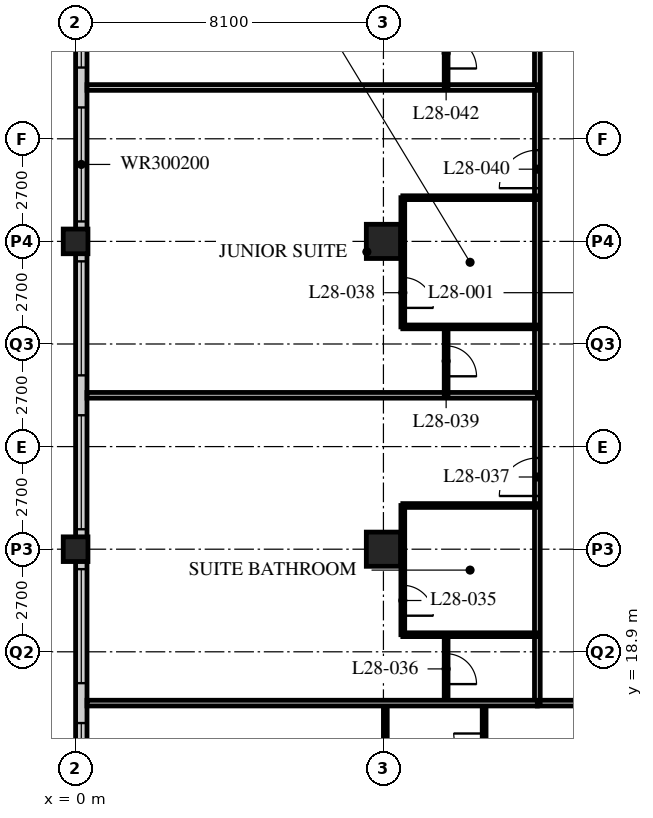
"""IFC4 building model, lengths in metres.
Left out: names, types, materials, properties, quantities, classifications, styles, units other than length and angle.
Written with IfcOpenShell. Run it as: python <this file> out.ifc"""

import sys

from ifc_helpers import new_model, si_unit, direction, frame, frame_2d, origin, origin_2d, place, context, subcontext, project, spatial, rectangle, hollow_rectangle, extrude, element, fill, save


model = new_model("IFC4")
c1 = context("Model", 3, precision=1e-05, world=origin(), true_north=direction((0.0, 1.0)))
c2 = subcontext(c1, "Body", "Model", "MODEL_VIEW")
j1 = project(units=[si_unit("LENGTHUNIT", "METRE"), si_unit("PLANEANGLEUNIT", "RADIAN")], contexts=[c1])
p1 = place(None, origin())
s1 = spatial("IfcSite", under=j1, at=p1, CompositionType="ELEMENT")
p2 = place(p1, origin())
s2 = spatial("IfcBuilding", under=s1, at=p2, CompositionType="ELEMENT")
p3 = place(p2, frame((0.0, 0.0, 113.6)))
s3 = spatial("IfcBuildingStorey", under=s2, at=p3, CompositionType="ELEMENT", Elevation=113.6)
for number, where, z_axis, x_axis in (
    (1, (0.0, 21.6, 0.0), (0.0, 0.0, 1.0), (1.0, 0.0, 0.0)),
    (2, (0.0, 29.7, 0.0), (0.0, 0.0, 1.0), (1.0, 0.0, 0.0)),
):
    element("IfcColumn", number, at=place(p3, frame(where, z_axis=z_axis, x_axis=x_axis)), inside=s3, PredefinedType="COLUMN", context=c2, shape_type="SweptSolid", body=[
        extrude(hollow_rectangle(XDim=0.65, YDim=0.65, WallThickness=0.055, at=origin_2d()), origin(), (0.0, 0.0, 1.0), 3.4),
    ])
for number, where, z_axis, x_axis in (
    (3, (8.1, 21.6, 0.0), (0.0, 0.0, 1.0), (1.0, 0.0, 0.0)),
    (4, (8.1, 29.7, 0.0), (0.0, 0.0, 1.0), (1.0, 0.0, 0.0)),
):
    element("IfcColumn", number, at=place(p3, frame(where, z_axis=z_axis, x_axis=x_axis)), inside=s3, PredefinedType="COLUMN", context=c2, shape_type="SweptSolid", body=[
        extrude(hollow_rectangle(XDim=0.9, YDim=0.9, WallThickness=0.09, at=origin_2d()), origin(), (0.0, 0.0, 1.0), 3.4),
    ])
p4 = place(p3, frame((0.15, 45.6, 0.0), z_axis=(0.0, 0.0, 1.0), x_axis=(0.0, -1.0, 0.0)))
e5 = element("IfcWall", 5, at=p4, inside=s3, PredefinedType="SOLIDWALL", context=c2, shape_type="SweptSolid", body=[
    extrude(rectangle(XDim=32.1, YDim=0.3, at=frame_2d((16.05, 0.0))), origin(), (0.0, 0.0, 1.0), 3.19),
])
p5 = place(p4, frame((0.225, 0.0, 0.9)))
e6 = element("IfcOpeningElement", 6, at=p5, cuts=e5, PredefinedType="OPENING", context=c2, shape_type="SweptSolid", body=[
    extrude(rectangle(XDim=3.0, YDim=2.0, at=frame_2d((1.5, 1.0))), frame((0.0, 0.16, 0.0), z_axis=(0.0, -1.0, 0.0), x_axis=(1.0, 0.0, 0.0)), (0.0, 0.0, 1.0), 0.32),
])
p6 = place(p4, frame((4.275, 0.0, 0.9)))
e7 = element("IfcOpeningElement", 7, at=p6, cuts=e5, PredefinedType="OPENING", context=c2, shape_type="SweptSolid", body=[
    extrude(rectangle(XDim=3.0, YDim=2.0, at=frame_2d((1.5, 1.0))), frame((0.0, 0.16, 0.0), z_axis=(0.0, -1.0, 0.0), x_axis=(1.0, 0.0, 0.0)), (0.0, 0.0, 1.0), 0.32),
])
p7 = place(p4, frame((8.325, 0.0, 0.9)))
e8 = element("IfcOpeningElement", 8, at=p7, cuts=e5, PredefinedType="OPENING", context=c2, shape_type="SweptSolid", body=[
    extrude(rectangle(XDim=3.0, YDim=2.0, at=frame_2d((1.5, 1.0))), frame((0.0, 0.16, 0.0), z_axis=(0.0, -1.0, 0.0), x_axis=(1.0, 0.0, 0.0)), (0.0, 0.0, 1.0), 0.32),
])
p8 = place(p4, frame((12.375, 0.0, 0.9)))
e9 = element("IfcOpeningElement", 9, at=p8, cuts=e5, PredefinedType="OPENING", context=c2, shape_type="SweptSolid", body=[
    extrude(rectangle(XDim=3.0, YDim=2.0, at=frame_2d((1.5, 1.0))), frame((0.0, 0.16, 0.0), z_axis=(0.0, -1.0, 0.0), x_axis=(1.0, 0.0, 0.0)), (0.0, 0.0, 1.0), 0.32),
])
p9 = place(p4, frame((16.425, 0.0, 0.9)))
e10 = element("IfcOpeningElement", 10, at=p9, cuts=e5, PredefinedType="OPENING", context=c2, shape_type="SweptSolid", body=[
    extrude(rectangle(XDim=3.0, YDim=2.0, at=frame_2d((1.5, 1.0))), frame((0.0, 0.16, 0.0), z_axis=(0.0, -1.0, 0.0), x_axis=(1.0, 0.0, 0.0)), (0.0, 0.0, 1.0), 0.32),
])
p10 = place(p4, frame((20.475, 0.0, 0.9)))
e11 = element("IfcOpeningElement", 11, at=p10, cuts=e5, PredefinedType="OPENING", context=c2, shape_type="SweptSolid", body=[
    extrude(rectangle(XDim=3.0, YDim=2.0, at=frame_2d((1.5, 1.0))), frame((0.0, 0.16, 0.0), z_axis=(0.0, -1.0, 0.0), x_axis=(1.0, 0.0, 0.0)), (0.0, 0.0, 1.0), 0.32),
])
p11 = place(p4, frame((24.525, 0.0, 0.9)))
e12 = element("IfcOpeningElement", 12, at=p11, cuts=e5, PredefinedType="OPENING", context=c2, shape_type="SweptSolid", body=[
    extrude(rectangle(XDim=3.0, YDim=2.0, at=frame_2d((1.5, 1.0))), frame((0.0, 0.16, 0.0), z_axis=(0.0, -1.0, 0.0), x_axis=(1.0, 0.0, 0.0)), (0.0, 0.0, 1.0), 0.32),
])
p12 = place(p4, frame((28.575, 0.0, 0.9)))
e13 = element("IfcOpeningElement", 13, at=p12, cuts=e5, PredefinedType="OPENING", context=c2, shape_type="SweptSolid", body=[
    extrude(rectangle(XDim=3.0, YDim=2.0, at=frame_2d((1.5, 1.0))), frame((0.0, 0.16, 0.0), z_axis=(0.0, -1.0, 0.0), x_axis=(1.0, 0.0, 0.0)), (0.0, 0.0, 1.0), 0.32),
])
p13 = place(p3, frame((12.15, 17.55, 0.0), z_axis=(0.0, 0.0, 1.0), x_axis=(1.0, 0.0, 0.0)))
e14 = element("IfcWall", 14, at=p13, inside=s3, PredefinedType="PARTITIONING", context=c2, shape_type="SweptSolid", body=[
    extrude(rectangle(XDim=32.4, YDim=0.15, at=frame_2d((16.2, 0.0))), origin(), (0.0, 0.0, 1.0), 3.19),
])
p14 = place(p13, frame((5.95, 0.0, 0.0)))
e15 = element("IfcOpeningElement", 15, at=p14, cuts=e14, PredefinedType="OPENING", context=c2, shape_type="SweptSolid", body=[
    extrude(rectangle(XDim=1.0, YDim=2.1, at=frame_2d((0.5, 1.05))), frame((0.0, 0.085, 0.0), z_axis=(0.0, -1.0, 0.0), x_axis=(1.0, 0.0, 0.0)), (0.0, 0.0, 1.0), 0.17),
])
p15 = place(p13, frame((17.725, 0.0, 0.0)))
e16 = element("IfcOpeningElement", 16, at=p15, cuts=e14, PredefinedType="OPENING", context=c2, shape_type="SweptSolid", body=[
    extrude(rectangle(XDim=1.0, YDim=2.1, at=frame_2d((0.5, 1.05))), frame((0.0, 0.085, 0.0), z_axis=(0.0, -1.0, 0.0), x_axis=(1.0, 0.0, 0.0)), (0.0, 0.0, 1.0), 0.17),
])
p16 = place(p13, frame((26.75, 0.0, 0.0)))
e17 = element("IfcOpeningElement", 17, at=p16, cuts=e14, PredefinedType="OPENING", context=c2, shape_type="SweptSolid", body=[
    extrude(rectangle(XDim=1.0, YDim=2.1, at=frame_2d((0.5, 1.05))), frame((0.0, 0.085, 0.0), z_axis=(0.0, -1.0, 0.0), x_axis=(1.0, 0.0, 0.0)), (0.0, 0.0, 1.0), 0.17),
])
p17 = place(p13, frame((1.525, 0.0, 0.0)))
e18 = element("IfcOpeningElement", 18, at=p17, cuts=e14, PredefinedType="OPENING", context=c2, shape_type="SweptSolid", body=[
    extrude(rectangle(XDim=1.0, YDim=2.1, at=frame_2d((0.5, 1.05))), frame((0.0, 0.085, 0.0), z_axis=(0.0, -1.0, 0.0), x_axis=(1.0, 0.0, 0.0)), (0.0, 0.0, 1.0), 0.17),
])
p18 = place(p13, frame((29.875, 0.0, 0.0)))
e19 = element("IfcOpeningElement", 19, at=p18, cuts=e14, PredefinedType="OPENING", context=c2, shape_type="SweptSolid", body=[
    extrude(rectangle(XDim=1.0, YDim=2.1, at=frame_2d((0.5, 1.05))), frame((0.0, 0.085, 0.0), z_axis=(0.0, -1.0, 0.0), x_axis=(1.0, 0.0, 0.0)), (0.0, 0.0, 1.0), 0.17),
])
p19 = place(p3, frame((12.15, 17.55, 0.0), z_axis=(0.0, 0.0, 1.0), x_axis=(0.0, 1.0, 0.0)))
e20 = element("IfcWall", 20, at=p19, inside=s3, PredefinedType="PARTITIONING", context=c2, shape_type="SweptSolid", body=[
    extrude(rectangle(XDim=28.35, YDim=0.15, at=frame_2d((14.175, 0.0))), origin(), (0.0, 0.0, 1.0), 3.19),
])
p20 = place(p19, frame((5.45, 0.0, 0.0)))
e21 = element("IfcOpeningElement", 21, at=p20, cuts=e20, PredefinedType="OPENING", context=c2, shape_type="SweptSolid", body=[
    extrude(rectangle(XDim=1.0, YDim=2.1, at=frame_2d((0.5, 1.05))), frame((0.0, 0.085, 0.0), z_axis=(0.0, -1.0, 0.0), x_axis=(1.0, 0.0, 0.0)), (0.0, 0.0, 1.0), 0.17),
])
p21 = place(p19, frame((13.55, 0.0, 0.0)))
e22 = element("IfcOpeningElement", 22, at=p21, cuts=e20, PredefinedType="OPENING", context=c2, shape_type="SweptSolid", body=[
    extrude(rectangle(XDim=1.0, YDim=2.1, at=frame_2d((0.5, 1.05))), frame((0.0, 0.085, 0.0), z_axis=(0.0, -1.0, 0.0), x_axis=(1.0, 0.0, 0.0)), (0.0, 0.0, 1.0), 0.17),
])
p22 = place(p19, frame((21.65, 0.0, 0.0)))
e23 = element("IfcOpeningElement", 23, at=p22, cuts=e20, PredefinedType="OPENING", context=c2, shape_type="SweptSolid", body=[
    extrude(rectangle(XDim=1.0, YDim=2.1, at=frame_2d((0.5, 1.05))), frame((0.0, 0.085, 0.0), z_axis=(0.0, -1.0, 0.0), x_axis=(1.0, 0.0, 0.0)), (0.0, 0.0, 1.0), 0.17),
])
p23 = place(p19, frame((26.75, 0.0, 0.0)))
e24 = element("IfcOpeningElement", 24, at=p23, cuts=e20, PredefinedType="OPENING", context=c2, shape_type="SweptSolid", body=[
    extrude(rectangle(XDim=1.0, YDim=2.1, at=frame_2d((0.5, 1.05))), frame((0.0, 0.085, 0.0), z_axis=(0.0, -1.0, 0.0), x_axis=(1.0, 0.0, 0.0)), (0.0, 0.0, 1.0), 0.17),
])
p24 = place(p3, frame((8.61, 19.35, 0.0), z_axis=(0.0, 0.0, 1.0), x_axis=(0.0, 1.0, 0.0)))
e25 = element("IfcWall", 25, at=p24, inside=s3, PredefinedType="PARTITIONING", context=c2, shape_type="SweptSolid", body=[
    extrude(rectangle(XDim=3.4, YDim=0.1, at=frame_2d((1.7, 0.0))), origin(), (0.0, 0.0, 1.0), 3.19),
])
p25 = place(p24, frame((0.5, 0.0, 0.0)))
e26 = element("IfcOpeningElement", 26, at=p25, cuts=e25, PredefinedType="OPENING", context=c2, shape_type="SweptSolid", body=[
    extrude(rectangle(XDim=0.8, YDim=2.1, at=frame_2d((0.4, 1.05))), frame((0.0, 0.06, 0.0), z_axis=(0.0, -1.0, 0.0), x_axis=(1.0, 0.0, 0.0)), (0.0, 0.0, 1.0), 0.12),
])
p26 = place(p3, frame((9.75, 17.55, 0.0), z_axis=(0.0, 0.0, 1.0), x_axis=(0.0, 1.0, 0.0)))
e27 = element("IfcWall", 27, at=p26, inside=s3, PredefinedType="PARTITIONING", context=c2, shape_type="SweptSolid", body=[
    extrude(rectangle(XDim=1.8, YDim=0.1, at=frame_2d((0.9, 0.0))), origin(), (0.0, 0.0, 1.0), 3.19),
])
p27 = place(p26, frame((0.5, 0.0, 0.0)))
e28 = element("IfcOpeningElement", 28, at=p27, cuts=e27, PredefinedType="OPENING", context=c2, shape_type="SweptSolid", body=[
    extrude(rectangle(XDim=0.8, YDim=2.1, at=frame_2d((0.4, 1.05))), frame((0.0, 0.06, 0.0), z_axis=(0.0, -1.0, 0.0), x_axis=(1.0, 0.0, 0.0)), (0.0, 0.0, 1.0), 0.12),
])
for number, where, z_axis, x_axis in (
    (29, (12.15, 19.35, 0.0), (0.0, 0.0, 1.0), (-1.0, 0.0, 0.0)),
    (30, (12.15, 22.75, 0.0), (0.0, 0.0, 1.0), (-1.0, 0.0, 0.0)),
):
    element("IfcWall", number, at=place(p3, frame(where, z_axis=z_axis, x_axis=x_axis)), inside=s3, PredefinedType="PARTITIONING", context=c2, shape_type="SweptSolid", body=[
        extrude(rectangle(XDim=3.54, YDim=0.1, at=frame_2d((1.77, 0.0))), origin(), (0.0, 0.0, 1.0), 3.19),
    ])
p28 = place(p3, frame((12.15, 25.65, 0.0), z_axis=(0.0, 0.0, 1.0), x_axis=(-1.0, 0.0, 0.0)))
e31 = element("IfcWall", 31, at=p28, inside=s3, PredefinedType="PARTITIONING", context=c2, shape_type="SweptSolid", body=[
    extrude(rectangle(XDim=11.85, YDim=0.15, at=frame_2d((5.925, 0.0))), origin(), (0.0, 0.0, 1.0), 3.19),
])
p29 = place(p3, frame((8.61, 27.45, 0.0), z_axis=(0.0, 0.0, 1.0), x_axis=(0.0, 1.0, 0.0)))
e32 = element("IfcWall", 32, at=p29, inside=s3, PredefinedType="PARTITIONING", context=c2, shape_type="SweptSolid", body=[
    extrude(rectangle(XDim=3.4, YDim=0.1, at=frame_2d((1.7, 0.0))), origin(), (0.0, 0.0, 1.0), 3.19),
])
p30 = place(p29, frame((0.5, 0.0, 0.0)))
e33 = element("IfcOpeningElement", 33, at=p30, cuts=e32, PredefinedType="OPENING", context=c2, shape_type="SweptSolid", body=[
    extrude(rectangle(XDim=0.8, YDim=2.1, at=frame_2d((0.4, 1.05))), frame((0.0, 0.06, 0.0), z_axis=(0.0, -1.0, 0.0), x_axis=(1.0, 0.0, 0.0)), (0.0, 0.0, 1.0), 0.12),
])
p31 = place(p3, frame((9.75, 25.65, 0.0), z_axis=(0.0, 0.0, 1.0), x_axis=(0.0, 1.0, 0.0)))
e34 = element("IfcWall", 34, at=p31, inside=s3, PredefinedType="PARTITIONING", context=c2, shape_type="SweptSolid", body=[
    extrude(rectangle(XDim=1.8, YDim=0.1, at=frame_2d((0.9, 0.0))), origin(), (0.0, 0.0, 1.0), 3.19),
])
p32 = place(p31, frame((0.5, 0.0, 0.0)))
e35 = element("IfcOpeningElement", 35, at=p32, cuts=e34, PredefinedType="OPENING", context=c2, shape_type="SweptSolid", body=[
    extrude(rectangle(XDim=0.8, YDim=2.1, at=frame_2d((0.4, 1.05))), frame((0.0, 0.06, 0.0), z_axis=(0.0, -1.0, 0.0), x_axis=(1.0, 0.0, 0.0)), (0.0, 0.0, 1.0), 0.12),
])
for number, where, z_axis, x_axis in (
    (36, (12.15, 27.45, 0.0), (0.0, 0.0, 1.0), (-1.0, 0.0, 0.0)),
    (37, (12.15, 30.85, 0.0), (0.0, 0.0, 1.0), (-1.0, 0.0, 0.0)),
):
    element("IfcWall", number, at=place(p3, frame(where, z_axis=z_axis, x_axis=x_axis)), inside=s3, PredefinedType="PARTITIONING", context=c2, shape_type="SweptSolid", body=[
        extrude(rectangle(XDim=3.54, YDim=0.1, at=frame_2d((1.77, 0.0))), origin(), (0.0, 0.0, 1.0), 3.19),
    ])
p33 = place(p3, frame((12.15, 33.75, 0.0), z_axis=(0.0, 0.0, 1.0), x_axis=(-1.0, 0.0, 0.0)))
e38 = element("IfcWall", 38, at=p33, inside=s3, PredefinedType="PARTITIONING", context=c2, shape_type="SweptSolid", body=[
    extrude(rectangle(XDim=11.85, YDim=0.15, at=frame_2d((5.925, 0.0))), origin(), (0.0, 0.0, 1.0), 3.19),
])
p34 = place(p3, frame((9.75, 33.75, 0.0), z_axis=(0.0, 0.0, 1.0), x_axis=(0.0, 1.0, 0.0)))
e39 = element("IfcWall", 39, at=p34, inside=s3, PredefinedType="PARTITIONING", context=c2, shape_type="SweptSolid", body=[
    extrude(rectangle(XDim=1.8, YDim=0.1, at=frame_2d((0.9, 0.0))), origin(), (0.0, 0.0, 1.0), 3.19),
])
p35 = place(p34, frame((0.5, 0.0, 0.0)))
e40 = element("IfcOpeningElement", 40, at=p35, cuts=e39, PredefinedType="OPENING", context=c2, shape_type="SweptSolid", body=[
    extrude(rectangle(XDim=0.8, YDim=2.1, at=frame_2d((0.4, 1.05))), frame((0.0, 0.06, 0.0), z_axis=(0.0, -1.0, 0.0), x_axis=(1.0, 0.0, 0.0)), (0.0, 0.0, 1.0), 0.12),
])
p36 = place(p3, frame((10.75, 17.55, 0.0), z_axis=(0.0, 0.0, 1.0), x_axis=(0.0, -1.0, 0.0)))
e41 = element("IfcWall", 41, at=p36, inside=s3, PredefinedType="PARTITIONING", context=c2, shape_type="SweptSolid", body=[
    extrude(rectangle(XDim=2.4, YDim=0.1, at=frame_2d((1.2, 0.0))), origin(), (0.0, 0.0, 1.0), 3.19),
])
p37 = place(p36, frame((0.8, 0.0, 0.0)))
e42 = element("IfcOpeningElement", 42, at=p37, cuts=e41, PredefinedType="OPENING", context=c2, shape_type="SweptSolid", body=[
    extrude(rectangle(XDim=0.8, YDim=2.1, at=frame_2d((0.4, 1.05))), frame((0.0, 0.06, 0.0), z_axis=(0.0, -1.0, 0.0), x_axis=(1.0, 0.0, 0.0)), (0.0, 0.0, 1.0), 0.12),
])
p38 = place(p3, frame((8.15, 17.55, 0.0), z_axis=(0.0, 0.0, 1.0), x_axis=(0.0, -1.0, 0.0)))
e43 = element("IfcWall", 43, at=p38, inside=s3, PredefinedType="PARTITIONING", context=c2, shape_type="SweptSolid", body=[
    extrude(rectangle(XDim=2.4, YDim=0.1, at=frame_2d((1.2, 0.0))), origin(), (0.0, 0.0, 1.0), 2.578),
])
p39 = place(p3, frame((0.3, 17.55, 0.0), z_axis=(0.0, 0.0, 1.0), x_axis=(1.0, 0.0, 0.0)))
e44 = element("IfcWall", 44, at=p39, inside=s3, PredefinedType="PARTITIONING", context=c2, shape_type="SweptSolid", body=[
    extrude(rectangle(XDim=11.85, YDim=0.15, at=frame_2d((5.925, 0.0))), origin(), (0.0, 0.0, 1.0), 3.19),
])
p40 = place(p7, origin())
e45 = element("IfcWindow", 45, at=p40, inside=s3, PartitioningType="SINGLE_PANEL", PredefinedType="WINDOW", context=c2, shape_type="SweptSolid", body=[
    extrude(rectangle(XDim=3.0, YDim=2.0, at=frame_2d((1.5, 1.0))), frame((0.0, 0.03, 0.0), z_axis=(0.0, -1.0, 0.0), x_axis=(1.0, 0.0, 0.0)), (0.0, 0.0, 1.0), 0.06),
])
fill(e8, e45)
p41 = place(p8, origin())
e46 = element("IfcWindow", 46, at=p41, inside=s3, PartitioningType="SINGLE_PANEL", PredefinedType="WINDOW", context=c2, shape_type="SweptSolid", body=[
    extrude(rectangle(XDim=3.0, YDim=2.0, at=frame_2d((1.5, 1.0))), frame((0.0, 0.03, 0.0), z_axis=(0.0, -1.0, 0.0), x_axis=(1.0, 0.0, 0.0)), (0.0, 0.0, 1.0), 0.06),
])
fill(e9, e46)
p42 = place(p9, origin())
e47 = element("IfcWindow", 47, at=p42, inside=s3, PartitioningType="SINGLE_PANEL", PredefinedType="WINDOW", context=c2, shape_type="SweptSolid", body=[
    extrude(rectangle(XDim=3.0, YDim=2.0, at=frame_2d((1.5, 1.0))), frame((0.0, 0.03, 0.0), z_axis=(0.0, -1.0, 0.0), x_axis=(1.0, 0.0, 0.0)), (0.0, 0.0, 1.0), 0.06),
])
fill(e10, e47)
p43 = place(p10, origin())
e48 = element("IfcWindow", 48, at=p43, inside=s3, PartitioningType="SINGLE_PANEL", PredefinedType="WINDOW", context=c2, shape_type="SweptSolid", body=[
    extrude(rectangle(XDim=3.0, YDim=2.0, at=frame_2d((1.5, 1.0))), frame((0.0, 0.03, 0.0), z_axis=(0.0, -1.0, 0.0), x_axis=(1.0, 0.0, 0.0)), (0.0, 0.0, 1.0), 0.06),
])
fill(e11, e48)
p44 = place(p11, origin())
e49 = element("IfcWindow", 49, at=p44, inside=s3, PartitioningType="SINGLE_PANEL", PredefinedType="WINDOW", context=c2, shape_type="SweptSolid", body=[
    extrude(rectangle(XDim=3.0, YDim=2.0, at=frame_2d((1.5, 1.0))), frame((0.0, 0.03, 0.0), z_axis=(0.0, -1.0, 0.0), x_axis=(1.0, 0.0, 0.0)), (0.0, 0.0, 1.0), 0.06),
])
fill(e12, e49)
p45 = place(p12, origin())
e50 = element("IfcWindow", 50, at=p45, inside=s3, PartitioningType="SINGLE_PANEL", PredefinedType="WINDOW", context=c2, shape_type="SweptSolid", body=[
    extrude(rectangle(XDim=3.0, YDim=2.0, at=frame_2d((1.5, 1.0))), frame((0.0, 0.03, 0.0), z_axis=(0.0, -1.0, 0.0), x_axis=(1.0, 0.0, 0.0)), (0.0, 0.0, 1.0), 0.06),
])
fill(e13, e50)
p46 = place(p25, origin())
e51 = element("IfcDoor", 51, at=p46, inside=s3, OperationType="SINGLE_SWING_RIGHT", PredefinedType="DOOR", context=c2, shape_type="SweptSolid", body=[
    extrude(rectangle(XDim=0.8, YDim=2.1, at=frame_2d((0.4, 1.05))), frame((0.0, 0.025, 0.0), z_axis=(0.0, -1.0, 0.0), x_axis=(1.0, 0.0, 0.0)), (0.0, 0.0, 1.0), 0.05),
])
fill(e26, e51)
p47 = place(p27, origin())
e52 = element("IfcDoor", 52, at=p47, inside=s3, OperationType="SINGLE_SWING_RIGHT", PredefinedType="DOOR", context=c2, shape_type="SweptSolid", body=[
    extrude(rectangle(XDim=0.8, YDim=2.1, at=frame_2d((0.4, 1.05))), frame((0.0, 0.025, 0.0), z_axis=(0.0, -1.0, 0.0), x_axis=(1.0, 0.0, 0.0)), (0.0, 0.0, 1.0), 0.05),
])
fill(e28, e52)
p48 = place(p20, origin())
e53 = element("IfcDoor", 53, at=p48, inside=s3, OperationType="SINGLE_SWING_LEFT", PredefinedType="DOOR", context=c2, shape_type="SweptSolid", body=[
    extrude(rectangle(XDim=1.0, YDim=2.1, at=frame_2d((0.5, 1.05))), frame((0.0, 0.025, 0.0), z_axis=(0.0, -1.0, 0.0), x_axis=(1.0, 0.0, 0.0)), (0.0, 0.0, 1.0), 0.05),
])
fill(e21, e53)
p49 = place(p30, origin())
e54 = element("IfcDoor", 54, at=p49, inside=s3, OperationType="SINGLE_SWING_RIGHT", PredefinedType="DOOR", context=c2, shape_type="SweptSolid", body=[
    extrude(rectangle(XDim=0.8, YDim=2.1, at=frame_2d((0.4, 1.05))), frame((0.0, 0.025, 0.0), z_axis=(0.0, -1.0, 0.0), x_axis=(1.0, 0.0, 0.0)), (0.0, 0.0, 1.0), 0.05),
])
fill(e33, e54)
p50 = place(p32, origin())
e55 = element("IfcDoor", 55, at=p50, inside=s3, OperationType="SINGLE_SWING_RIGHT", PredefinedType="DOOR", context=c2, shape_type="SweptSolid", body=[
    extrude(rectangle(XDim=0.8, YDim=2.1, at=frame_2d((0.4, 1.05))), frame((0.0, 0.025, 0.0), z_axis=(0.0, -1.0, 0.0), x_axis=(1.0, 0.0, 0.0)), (0.0, 0.0, 1.0), 0.05),
])
fill(e35, e55)
p51 = place(p21, origin())
e56 = element("IfcDoor", 56, at=p51, inside=s3, OperationType="SINGLE_SWING_LEFT", PredefinedType="DOOR", context=c2, shape_type="SweptSolid", body=[
    extrude(rectangle(XDim=1.0, YDim=2.1, at=frame_2d((0.5, 1.05))), frame((0.0, 0.025, 0.0), z_axis=(0.0, -1.0, 0.0), x_axis=(1.0, 0.0, 0.0)), (0.0, 0.0, 1.0), 0.05),
])
fill(e22, e56)
p52 = place(p35, origin())
e57 = element("IfcDoor", 57, at=p52, inside=s3, OperationType="SINGLE_SWING_RIGHT", PredefinedType="DOOR", context=c2, shape_type="SweptSolid", body=[
    extrude(rectangle(XDim=0.8, YDim=2.1, at=frame_2d((0.4, 1.05))), frame((0.0, 0.025, 0.0), z_axis=(0.0, -1.0, 0.0), x_axis=(1.0, 0.0, 0.0)), (0.0, 0.0, 1.0), 0.05),
])
fill(e40, e57)
p53 = place(p37, origin())
e58 = element("IfcDoor", 58, at=p53, inside=s3, OperationType="SINGLE_SWING_RIGHT", PredefinedType="DOOR", context=c2, shape_type="SweptSolid", body=[
    extrude(rectangle(XDim=0.8, YDim=2.1, at=frame_2d((0.4, 1.05))), frame((0.0, 0.025, 0.0), z_axis=(0.0, -1.0, 0.0), x_axis=(1.0, 0.0, 0.0)), (0.0, 0.0, 1.0), 0.05),
])
fill(e42, e58)
save(model, sys.argv[1])
